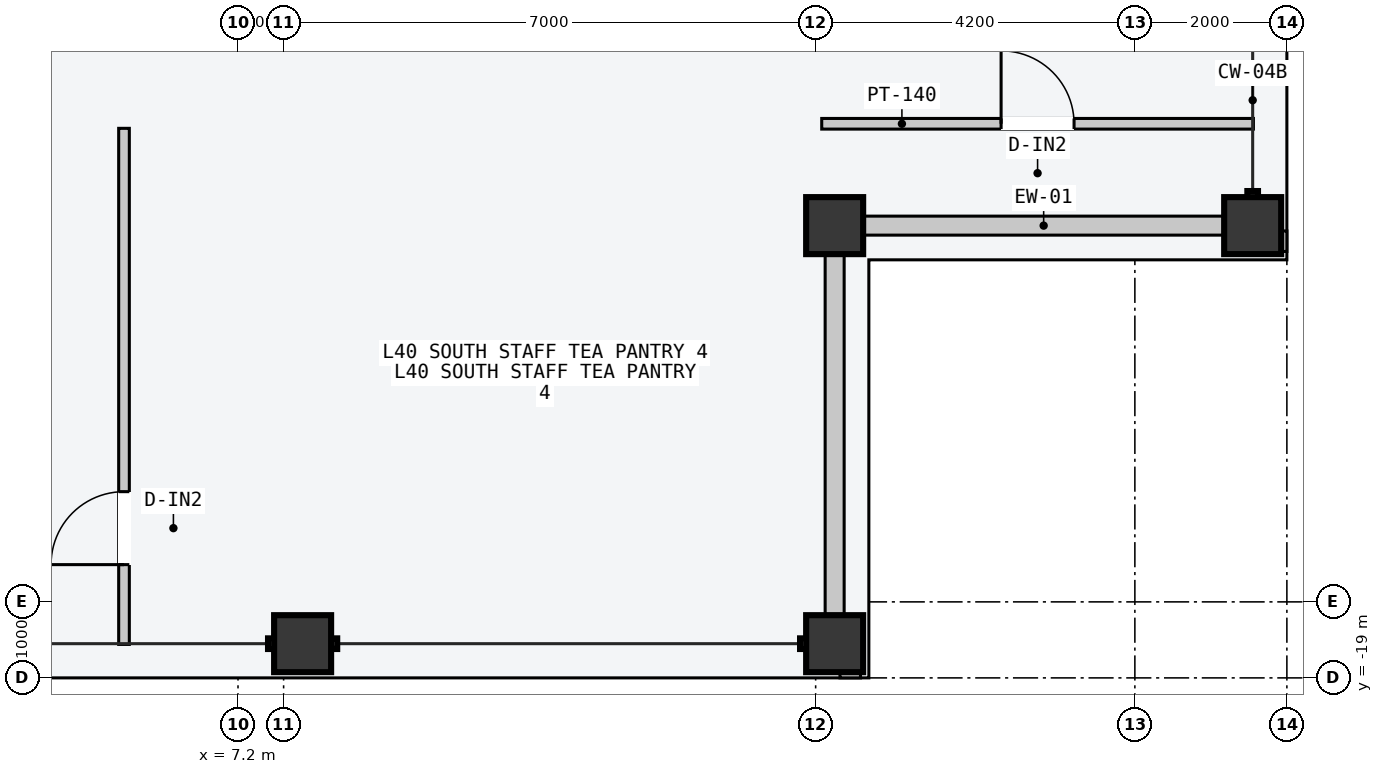
"""IFC4 building model, lengths in metres.
Left out: names, types, materials, properties, quantities, classifications, styles, units other than length and angle.
Written with IfcOpenShell. Run it as: python <this file> out.ifc"""

import sys

from ifc_helpers import new_model, si_unit, direction, frame, frame_2d, origin, origin_2d, place, context, subcontext, project, spatial, rectangle, hollow_rectangle, extrude, element, fill, save


model = new_model("IFC4")
c1 = context("Model", 3, precision=1e-05, world=origin(), true_north=direction((0.0, 1.0)))
c2 = subcontext(c1, "Body", "Model", "MODEL_VIEW")
j1 = project(units=[si_unit("LENGTHUNIT", "METRE"), si_unit("PLANEANGLEUNIT", "RADIAN")], contexts=[c1])
p1 = place(None, origin())
s1 = spatial("IfcSite", under=j1, at=p1, CompositionType="ELEMENT")
p2 = place(p1, origin())
s2 = spatial("IfcBuilding", under=s1, at=p2, CompositionType="ELEMENT")
p3 = place(p2, frame((0.0, 0.0, 155.1)))
s3 = spatial("IfcBuildingStorey", under=s2, at=p3, CompositionType="ELEMENT", Elevation=155.1)
for number, where, z_axis, x_axis in (
    (1, (8.05, -18.55, 0.0), (0.0, 0.0, 1.0), (1.0, 0.0, 0.0)),
    (2, (15.05, -18.55, 0.0), (0.0, 0.0, 1.0), (1.0, 0.0, 0.0)),
    (3, (20.55, -13.05, 0.0), (0.0, 0.0, 1.0), (0.0, 1.0, 0.0)),
    (4, (15.05, -13.05, 0.0), (0.0, 0.0, 1.0), (1.0, 0.0, 0.0)),
):
    element("IfcColumn", number, at=place(p3, frame(where, z_axis=z_axis, x_axis=x_axis)), inside=s3, PredefinedType="COLUMN", context=c2, shape_type="SweptSolid", body=[
        extrude(hollow_rectangle(XDim=0.75, YDim=0.75, WallThickness=0.032, at=origin_2d()), origin(), (0.0, 0.0, 1.0), 3.6),
    ])
for number, where, z_axis, x_axis in (
    (5, (15.435, -13.05, 0.0), (0.0, 0.0, 1.0), (1.0, 0.0, 0.0)),
    (6, (15.05, -18.165, 0.0), (0.0, 0.0, 1.0), (0.0, 1.0, 0.0)),
):
    element("IfcWall", number, at=place(p3, frame(where, z_axis=z_axis, x_axis=x_axis)), inside=s3, PredefinedType="STANDARD", context=c2, shape_type="SweptSolid", body=[
        extrude(rectangle(XDim=4.73, YDim=0.25, at=frame_2d((2.365, 0.0))), origin(), (0.0, 0.0, 1.0), 2.75),
    ])
for number, where, z_axis, x_axis in (
    (7, (15.12, -18.89, 0.0), (0.0, 0.0, 1.0), (1.0, 0.0, 0.0)),
    (8, (20.89, -13.39, 0.0), (0.0, 0.0, 1.0), (0.0, 1.0, 0.0)),
):
    element("IfcWall", number, at=place(p3, frame(where, z_axis=z_axis, x_axis=x_axis)), inside=s3, PredefinedType="PARAPET", context=c2, shape_type="SweptSolid", body=[
        extrude(rectangle(XDim=0.27, YDim=0.22, at=frame_2d((0.135, 0.0))), origin(), (0.0, 0.0, 1.0), 1.2),
    ])
p4 = place(p3, frame((5.7, -18.56, 0.0), z_axis=(0.0, 0.0, 1.0), x_axis=(0.0, 1.0, 0.0)))
e9 = element("IfcWall", 9, at=p4, inside=s3, PredefinedType="PARTITIONING", context=c2, shape_type="SweptSolid", body=[
    extrude(rectangle(XDim=6.79, YDim=0.14, at=frame_2d((3.395, 0.0))), origin(), (0.0, 0.0, 1.0), 3.4),
])
p5 = place(p4, frame((1.05, 0.0, 0.0)))
e10 = element("IfcOpeningElement", 10, at=p5, cuts=e9, PredefinedType="OPENING", context=c2, shape_type="SweptSolid", body=[
    extrude(rectangle(XDim=0.96, YDim=2.18, at=frame_2d((0.48, 1.09))), frame((0.0, 0.08, 0.0), z_axis=(0.0, -1.0, 0.0), x_axis=(1.0, 0.0, 0.0)), (0.0, 0.0, 1.0), 0.16),
])
p6 = place(p3, frame((14.88, -11.71, 0.0), z_axis=(0.0, 0.0, 1.0), x_axis=(1.0, 0.0, 0.0)))
e11 = element("IfcWall", 11, at=p6, inside=s3, PredefinedType="PARTITIONING", context=c2, shape_type="SweptSolid", body=[
    extrude(rectangle(XDim=5.68, YDim=0.14, at=frame_2d((2.84, 0.0))), origin(), (0.0, 0.0, 1.0), 3.4),
])
p7 = place(p6, frame((2.36, 0.0, 0.0)))
e12 = element("IfcOpeningElement", 12, at=p7, cuts=e11, PredefinedType="OPENING", context=c2, shape_type="SweptSolid", body=[
    extrude(rectangle(XDim=0.96, YDim=2.18, at=frame_2d((0.48, 1.09))), frame((0.0, 0.08, 0.0), z_axis=(0.0, -1.0, 0.0), x_axis=(1.0, 0.0, 0.0)), (0.0, 0.0, 1.0), 0.16),
])
p8 = place(p5, origin())
e13 = element("IfcDoor", 13, at=p8, inside=s3, OperationType="SINGLE_SWING_LEFT", PredefinedType="DOOR", context=c2, shape_type="SweptSolid", body=[
    extrude(rectangle(XDim=0.96, YDim=2.18, at=frame_2d((0.48, 1.09))), frame((0.0, 0.025, 0.0), z_axis=(0.0, -1.0, 0.0), x_axis=(1.0, 0.0, 0.0)), (0.0, 0.0, 1.0), 0.05),
])
fill(e10, e13)
p9 = place(p7, origin())
e14 = element("IfcDoor", 14, at=p9, inside=s3, OperationType="SINGLE_SWING_LEFT", PredefinedType="DOOR", context=c2, shape_type="SweptSolid", body=[
    extrude(rectangle(XDim=0.96, YDim=2.18, at=frame_2d((0.48, 1.09))), frame((0.0, 0.025, 0.0), z_axis=(0.0, -1.0, 0.0), x_axis=(1.0, 0.0, 0.0)), (0.0, 0.0, 1.0), 0.05),
])
fill(e12, e14)
save(model, sys.argv[1])
